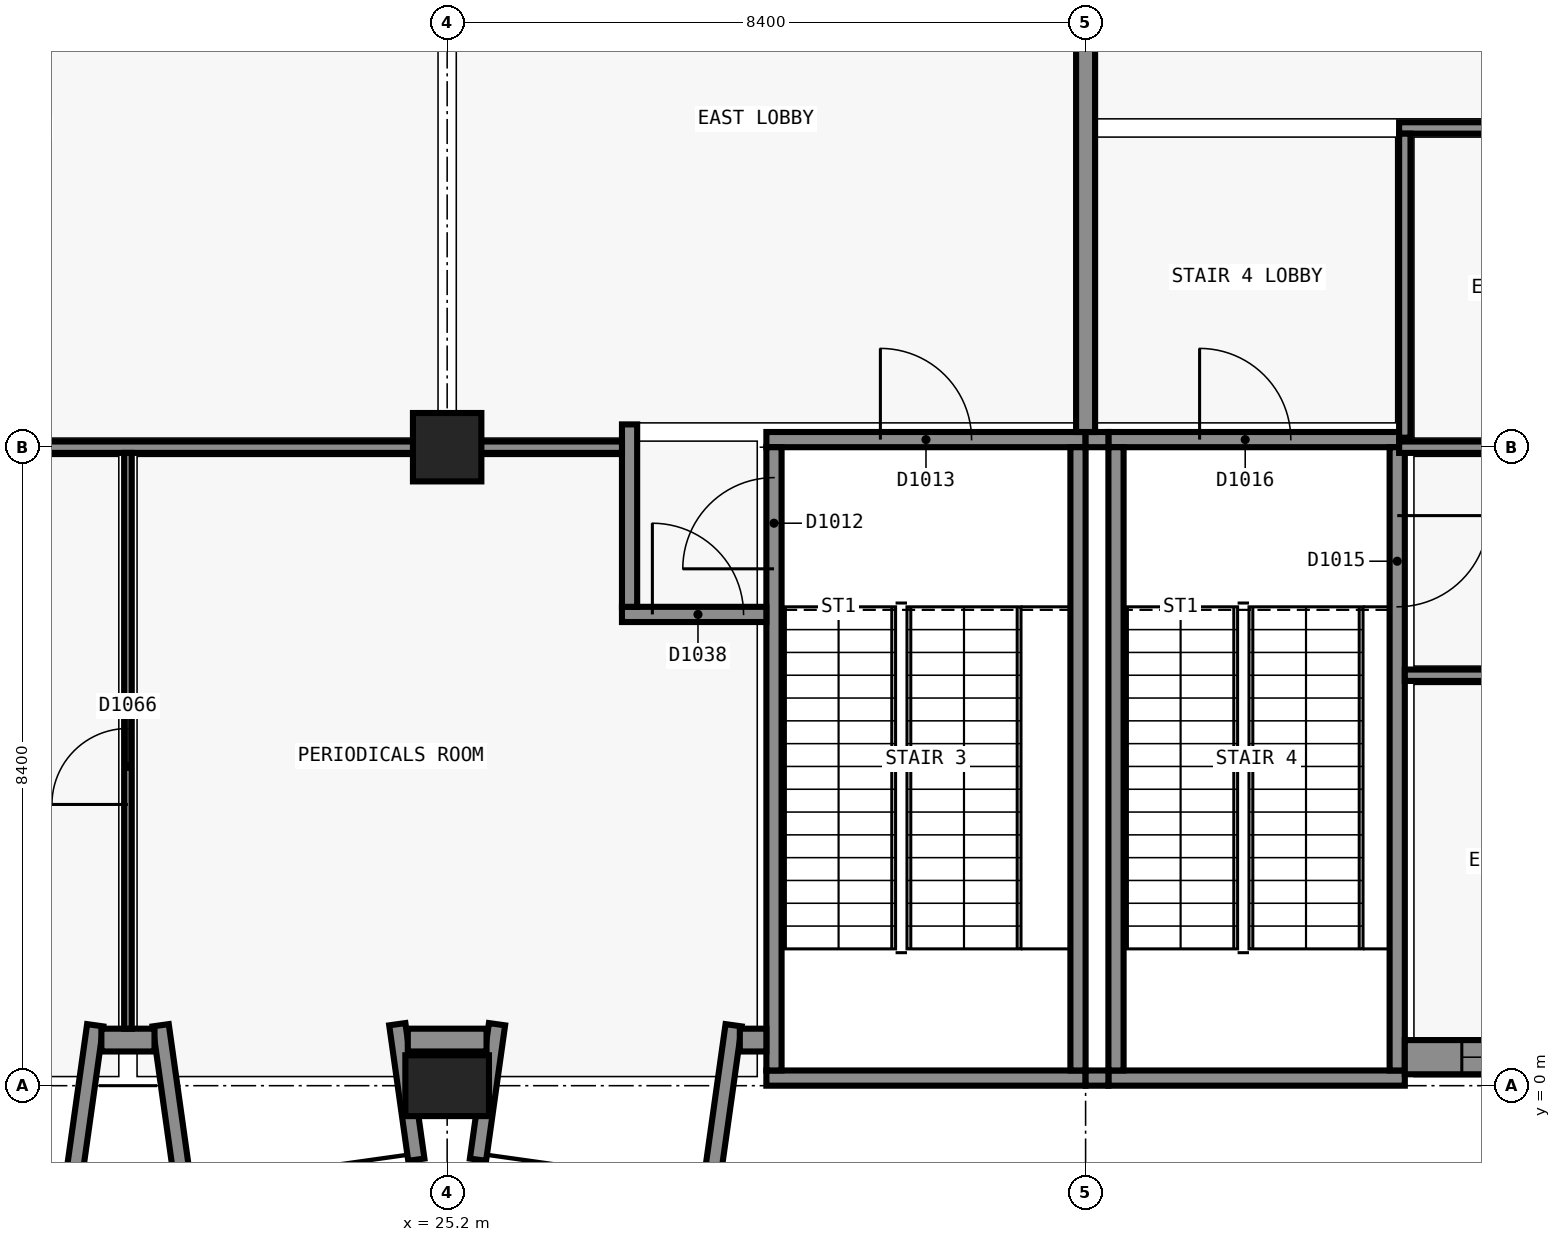
"""IFC4 building model, lengths in metres.
Left out: names, types, materials, properties, quantities, classifications, styles, units other than length and angle.
Written with IfcOpenShell. Run it as: python <this file> out.ifc"""

import sys

from ifc_helpers import new_model, si_unit, direction, frame, frame_2d, origin, origin_2d, place, context, subcontext, project, spatial, rectangle, extrude, element, fill, save


model = new_model("IFC4")
c1 = context("Model", 3, precision=1e-05, world=origin(), true_north=direction((0.0, 1.0)))
c2 = subcontext(c1, "Body", "Model", "MODEL_VIEW")
j1 = project(units=[si_unit("LENGTHUNIT", "METRE"), si_unit("PLANEANGLEUNIT", "RADIAN")], contexts=[c1])
p1 = place(None, origin())
s1 = spatial("IfcSite", under=j1, at=p1, CompositionType="ELEMENT")
p2 = place(p1, origin())
s2 = spatial("IfcBuilding", under=s1, at=p2, CompositionType="ELEMENT")
p3 = place(p2, frame((0.0, 0.0, 5.4)))
s3 = spatial("IfcBuildingStorey", under=s2, at=p3, CompositionType="ELEMENT", Elevation=5.4)
p4 = place(p3, frame((33.6, 0.1, 0.0), z_axis=(0.0, 0.0, 1.0), x_axis=(-1.0, 0.0, 0.0)))
e1 = element("IfcWall", 1, at=p4, inside=s3, PredefinedType="SHEAR", context=c2, shape_type="SweptSolid", body=[
    extrude(rectangle(XDim=4.2, YDim=0.2, at=frame_2d((2.1, 0.0))), origin(), (0.0, 0.0, 1.0), 4.8),
])
p5 = place(p3, frame((29.4, 8.5, 0.0), z_axis=(0.0, 0.0, 1.0), x_axis=(1.0, 0.0, 0.0)))
e2 = element("IfcWall", 2, at=p5, inside=s3, PredefinedType="SHEAR", context=c2, shape_type="SweptSolid", body=[
    extrude(rectangle(XDim=4.2, YDim=0.2, at=frame_2d((2.1, 0.0))), origin(), (0.0, 0.0, 1.0), 4.8),
])
p6 = place(p5, frame((1.5, 0.0, 0.0)))
e3 = element("IfcOpeningElement", 3, at=p6, cuts=e2, PredefinedType="OPENING", context=c2, shape_type="SweptSolid", body=[
    extrude(rectangle(XDim=1.2, YDim=2.1, at=frame_2d((0.6, 1.05))), frame((0.0, 0.11, 0.0), z_axis=(0.0, -1.0, 0.0), x_axis=(1.0, 0.0, 0.0)), (0.0, 0.0, 1.0), 0.22),
])
p7 = place(p3, frame((29.5, 0.2, 0.0), z_axis=(0.0, 0.0, 1.0), x_axis=(0.0, 1.0, 0.0)))
e4 = element("IfcWall", 4, at=p7, inside=s3, PredefinedType="SHEAR", context=c2, shape_type="SweptSolid", body=[
    extrude(rectangle(XDim=8.2, YDim=0.2, at=frame_2d((4.1, 0.0))), origin(), (0.0, 0.0, 1.0), 4.8),
])
p8 = place(p7, frame((6.6, 0.0, 0.0)))
e5 = element("IfcOpeningElement", 5, at=p8, cuts=e4, PredefinedType="OPENING", context=c2, shape_type="SweptSolid", body=[
    extrude(rectangle(XDim=1.2, YDim=2.1, at=frame_2d((0.6, 1.05))), frame((0.0, 0.11, 0.0), z_axis=(0.0, -1.0, 0.0), x_axis=(1.0, 0.0, 0.0)), (0.0, 0.0, 1.0), 0.22),
])
p9 = place(p3, frame((33.5, 8.4, 0.0), z_axis=(0.0, 0.0, 1.0), x_axis=(0.0, -1.0, 0.0)))
e6 = element("IfcWall", 6, at=p9, inside=s3, PredefinedType="SHEAR", context=c2, shape_type="SweptSolid", body=[
    extrude(rectangle(XDim=8.2, YDim=0.2, at=frame_2d((4.1, 0.0))), origin(), (0.0, 0.0, 1.0), 4.8),
])
p10 = place(p3, frame((37.8, 0.1, 0.0), z_axis=(0.0, 0.0, 1.0), x_axis=(-1.0, 0.0, 0.0)))
e7 = element("IfcWall", 7, at=p10, inside=s3, PredefinedType="SHEAR", context=c2, shape_type="SweptSolid", body=[
    extrude(rectangle(XDim=3.9, YDim=0.2, at=frame_2d((1.95, 0.0))), origin(), (0.0, 0.0, 1.0), 4.8),
])
p11 = place(p3, frame((33.9, 8.5, 0.0), z_axis=(0.0, 0.0, 1.0), x_axis=(1.0, 0.0, 0.0)))
e8 = element("IfcWall", 8, at=p11, inside=s3, PredefinedType="SHEAR", context=c2, shape_type="SweptSolid", body=[
    extrude(rectangle(XDim=3.9, YDim=0.2, at=frame_2d((1.95, 0.0))), origin(), (0.0, 0.0, 1.0), 4.8),
])
p12 = place(p11, frame((1.2, 0.0, 0.0)))
e9 = element("IfcOpeningElement", 9, at=p12, cuts=e8, PredefinedType="OPENING", context=c2, shape_type="SweptSolid", body=[
    extrude(rectangle(XDim=1.2, YDim=2.1, at=frame_2d((0.6, 1.05))), frame((0.0, 0.11, 0.0), z_axis=(0.0, -1.0, 0.0), x_axis=(1.0, 0.0, 0.0)), (0.0, 0.0, 1.0), 0.22),
])
p13 = place(p3, frame((34.0, 0.2, 0.0), z_axis=(0.0, 0.0, 1.0), x_axis=(0.0, 1.0, 0.0)))
e10 = element("IfcWall", 10, at=p13, inside=s3, PredefinedType="SHEAR", context=c2, shape_type="SweptSolid", body=[
    extrude(rectangle(XDim=8.2, YDim=0.2, at=frame_2d((4.1, 0.0))), origin(), (0.0, 0.0, 1.0), 4.8),
])
p14 = place(p3, frame((37.7, 8.4, 0.0), z_axis=(0.0, 0.0, 1.0), x_axis=(0.0, -1.0, 0.0)))
e11 = element("IfcWall", 11, at=p14, inside=s3, PredefinedType="SHEAR", context=c2, shape_type="SweptSolid", body=[
    extrude(rectangle(XDim=8.2, YDim=0.2, at=frame_2d((4.1, 0.0))), origin(), (0.0, 0.0, 1.0), 4.8),
])
p15 = place(p14, frame((0.9, 0.0, 0.0)))
e12 = element("IfcOpeningElement", 12, at=p15, cuts=e11, PredefinedType="OPENING", context=c2, shape_type="SweptSolid", body=[
    extrude(rectangle(XDim=1.2, YDim=2.1, at=frame_2d((0.6, 1.05))), frame((0.0, 0.11, 0.0), z_axis=(0.0, -1.0, 0.0), x_axis=(1.0, 0.0, 0.0)), (0.0, 0.0, 1.0), 0.22),
])
p16 = place(p3, frame((25.2, 0.0, 0.0), z_axis=(0.0, 0.0, 1.0), x_axis=(1.0, 0.0, 0.0)))
e13 = element("IfcColumn", 13, at=p16, inside=s3, PredefinedType="COLUMN", context=c2, shape_type="SweptSolid", body=[
    extrude(rectangle(XDim=1.1, YDim=0.8, at=origin_2d()), origin(), (0.0, 0.0, 1.0), 4.8),
])
p17 = place(p3, frame((25.2, 8.4, 0.0), z_axis=(0.0, 0.0, 1.0), x_axis=(1.0, 0.0, 0.0)))
e14 = element("IfcColumn", 14, at=p17, inside=s3, PredefinedType="COLUMN", context=c2, shape_type="SweptSolid", body=[
    extrude(rectangle(XDim=0.9, YDim=0.9, at=origin_2d()), origin(), (0.0, 0.0, 1.0), 4.8),
])
for number, where, z_axis, x_axis in (
    (15, (33.9, 0.1, 0.0), (0.0, 0.0, 1.0), (-1.0, 0.0, 0.0)),
    (16, (33.6, 8.5, 0.0), (0.0, 0.0, 1.0), (1.0, 0.0, 0.0)),
):
    element("IfcWall", number, at=place(p3, frame(where, z_axis=z_axis, x_axis=x_axis)), inside=s3, PredefinedType="SHEAR", context=c2, shape_type="SweptSolid", body=[
        extrude(rectangle(XDim=0.3, YDim=0.2, at=frame_2d((0.15, 0.0))), origin(), (0.0, 0.0, 1.0), 4.8),
    ])
for number, where, z_axis, x_axis in (
    (17, (20.569, 0.795, 0.0), (0.0, 0.0, 1.0), (-0.139, -0.99, 0.0)),
    (18, (21.431, 0.795, 0.0), (0.0, 0.0, 1.0), (0.139, -0.99, 0.0)),
):
    element("IfcWall", number, at=place(p3, frame(where, z_axis=z_axis, x_axis=x_axis)), inside=s3, PredefinedType="SOLIDWALL", context=c2, shape_type="SweptSolid", body=[
        extrude(rectangle(XDim=2.219, YDim=0.215, at=frame_2d((1.11, 0.0))), origin(), (0.0, 0.0, 1.0), 4.5),
    ])
for number, where, z_axis, x_axis in (
    (19, (24.544, 0.809, 0.0), (0.0, 0.0, 1.0), (0.139, -0.99, 0.0)),
    (20, (25.856, 0.809, 0.0), (0.0, 0.0, 1.0), (-0.139, -0.99, 0.0)),
):
    element("IfcWall", number, at=place(p3, frame(where, z_axis=z_axis, x_axis=x_axis)), inside=s3, PredefinedType="SOLIDWALL", context=c2, shape_type="SweptSolid", body=[
        extrude(rectangle(XDim=1.8, YDim=0.215, at=frame_2d((0.9, 0.0))), origin(), (0.0, 0.0, 1.0), 4.5),
    ])
p18 = place(p3, frame((28.969, 0.795, 0.0), z_axis=(0.0, 0.0, 1.0), x_axis=(-0.139249775508, -0.99025728981, 0.0)))
e21 = element("IfcWall", 21, at=p18, inside=s3, PredefinedType="SOLIDWALL", context=c2, shape_type="SweptSolid", body=[
    extrude(rectangle(XDim=2.22, YDim=0.215, at=frame_2d((1.11, 0.0))), origin(), (0.0, 0.0, 1.0), 4.5),
])
p19 = place(p3, frame((21.35, 0.6, 0.0), z_axis=(0.0, 0.0, 1.0), x_axis=(-1.0, 0.0, 0.0)))
e22 = element("IfcWall", 22, at=p19, inside=s3, PredefinedType="SOLIDWALL", context=c2, shape_type="SweptSolid", body=[
    extrude(rectangle(XDim=0.699, YDim=0.3, at=frame_2d((0.35, 0.0))), origin(), (0.0, 0.0, 1.0), 4.5),
])
p20 = place(p3, frame((25.718, 0.6, 0.0), z_axis=(0.0, 0.0, 1.0), x_axis=(-1.0, 0.0, 0.0)))
e23 = element("IfcWall", 23, at=p20, inside=s3, PredefinedType="SOLIDWALL", context=c2, shape_type="SweptSolid", body=[
    extrude(rectangle(XDim=1.036, YDim=0.3, at=frame_2d((0.518, 0.0))), origin(), (0.0, 0.0, 1.0), 4.5),
])
p21 = place(p3, frame((29.4, 0.6, 0.0), z_axis=(0.0, 0.0, 1.0), x_axis=(-1.0, 0.0, 0.0)))
e24 = element("IfcWall", 24, at=p21, inside=s3, PredefinedType="SOLIDWALL", context=c2, shape_type="SweptSolid", body=[
    extrude(rectangle(XDim=0.349, YDim=0.3, at=frame_2d((0.175, 0.0))), origin(), (0.0, 0.0, 1.0), 4.5),
])
p22 = place(p3, frame((44.481, 0.375, 0.0), z_axis=(0.0, 0.0, 1.0), x_axis=(-1.0, 0.0, 0.0)))
e25 = element("IfcWall", 25, at=p22, inside=s3, PredefinedType="SOLIDWALL", context=c2, shape_type="SweptSolid", body=[
    extrude(rectangle(XDim=6.681, YDim=0.45, at=frame_2d((3.341, 0.0))), origin(), (0.0, 0.0, 1.0), 4.5),
])
p23 = place(p22, frame((3.531, 0.0, 0.9)))
e26 = element("IfcOpeningElement", 26, at=p23, cuts=e25, PredefinedType="OPENING", context=c2, shape_type="SweptSolid", body=[
    extrude(rectangle(XDim=2.4, YDim=1.5, at=frame_2d((1.2, 0.75))), frame((0.0, 0.235, 0.0), z_axis=(0.0, -1.0, 0.0), x_axis=(1.0, 0.0, 0.0)), (0.0, 0.0, 1.0), 0.47),
])
p24 = place(p22, frame((0.341, 0.0, 0.9)))
e27 = element("IfcOpeningElement", 27, at=p24, cuts=e25, PredefinedType="OPENING", context=c2, shape_type="SweptSolid", body=[
    extrude(rectangle(XDim=1.2, YDim=1.5, at=frame_2d((0.6, 0.75))), frame((0.0, 0.235, 0.0), z_axis=(0.0, -1.0, 0.0), x_axis=(1.0, 0.0, 0.0)), (0.0, 0.0, 1.0), 0.47),
])
p25 = place(p3, frame((33.6, 8.6, 0.0), z_axis=(0.0, 0.0, 1.0), x_axis=(0.0, 1.0, 0.0)))
e28 = element("IfcWall", 28, at=p25, inside=s3, PredefinedType="SOLIDWALL", context=c2, shape_type="SweptSolid", body=[
    extrude(rectangle(XDim=15.85, YDim=0.25, at=frame_2d((7.925, 0.0))), origin(), (0.0, 0.0, 1.0), 3.8),
])
p26 = place(p3, frame((27.5, 6.2, 0.0), z_axis=(0.0, 0.0, 1.0), x_axis=(1.0, 0.0, 0.0)))
e29 = element("IfcWall", 29, at=p26, inside=s3, PredefinedType="SOLIDWALL", context=c2, shape_type="SweptSolid", body=[
    extrude(rectangle(XDim=1.9, YDim=0.2, at=frame_2d((0.95, 0.0))), origin(), (0.0, 0.0, 1.0), 4.5),
])
p27 = place(p26, frame((0.4, 0.0, 0.0)))
e30 = element("IfcOpeningElement", 30, at=p27, cuts=e29, PredefinedType="OPENING", context=c2, shape_type="SweptSolid", body=[
    extrude(rectangle(XDim=1.2, YDim=2.1, at=frame_2d((0.6, 1.05))), frame((0.0, 0.11, 0.0), z_axis=(0.0, -1.0, 0.0), x_axis=(1.0, 0.0, 0.0)), (0.0, 0.0, 1.0), 0.22),
])
p28 = place(p3, frame((27.6, 6.3, 0.0), z_axis=(0.0, 0.0, 1.0), x_axis=(0.0, 1.0, 0.0)))
e31 = element("IfcWall", 31, at=p28, inside=s3, PredefinedType="SOLIDWALL", context=c2, shape_type="SweptSolid", body=[
    extrude(rectangle(XDim=2.4, YDim=0.2, at=frame_2d((1.2, 0.0))), origin(), (0.0, 0.0, 1.0), 4.0),
])
p29 = place(p3, frame((37.8, 5.4, 0.0), z_axis=(0.0, 0.0, 1.0), x_axis=(1.0, 0.0, 0.0)))
e32 = element("IfcWall", 32, at=p29, inside=s3, PredefinedType="PARTITIONING", context=c2, shape_type="SweptSolid", body=[
    extrude(rectangle(XDim=20.3, YDim=0.15, at=frame_2d((10.15, 0.0))), origin(), (0.0, 0.0, 1.0), 3.8),
])
p30 = place(p29, frame((1.6, 0.0, 0.0)))
e33 = element("IfcOpeningElement", 33, at=p30, cuts=e32, PredefinedType="OPENING", context=c2, shape_type="SweptSolid", body=[
    extrude(rectangle(XDim=1.0, YDim=2.1, at=frame_2d((0.5, 1.05))), frame((0.0, 0.085, 0.0), z_axis=(0.0, -1.0, 0.0), x_axis=(1.0, 0.0, 0.0)), (0.0, 0.0, 1.0), 0.17),
])
p31 = place(p29, frame((5.8, 0.0, 0.0)))
e34 = element("IfcOpeningElement", 34, at=p31, cuts=e32, PredefinedType="OPENING", context=c2, shape_type="SweptSolid", body=[
    extrude(rectangle(XDim=1.0, YDim=2.1, at=frame_2d((0.5, 1.05))), frame((0.0, 0.085, 0.0), z_axis=(0.0, -1.0, 0.0), x_axis=(1.0, 0.0, 0.0)), (0.0, 0.0, 1.0), 0.17),
])
p32 = place(p29, frame((10.0, 0.0, 0.0)))
e35 = element("IfcOpeningElement", 35, at=p32, cuts=e32, PredefinedType="OPENING", context=c2, shape_type="SweptSolid", body=[
    extrude(rectangle(XDim=1.0, YDim=2.1, at=frame_2d((0.5, 1.05))), frame((0.0, 0.085, 0.0), z_axis=(0.0, -1.0, 0.0), x_axis=(1.0, 0.0, 0.0)), (0.0, 0.0, 1.0), 0.17),
])
p33 = place(p29, frame((14.2, 0.0, 0.0)))
e36 = element("IfcOpeningElement", 36, at=p33, cuts=e32, PredefinedType="OPENING", context=c2, shape_type="SweptSolid", body=[
    extrude(rectangle(XDim=1.0, YDim=2.1, at=frame_2d((0.5, 1.05))), frame((0.0, 0.085, 0.0), z_axis=(0.0, -1.0, 0.0), x_axis=(1.0, 0.0, 0.0)), (0.0, 0.0, 1.0), 0.17),
])
p34 = place(p29, frame((18.4, 0.0, 0.0)))
e37 = element("IfcOpeningElement", 37, at=p34, cuts=e32, PredefinedType="OPENING", context=c2, shape_type="SweptSolid", body=[
    extrude(rectangle(XDim=1.0, YDim=2.1, at=frame_2d((0.5, 1.05))), frame((0.0, 0.085, 0.0), z_axis=(0.0, -1.0, 0.0), x_axis=(1.0, 0.0, 0.0)), (0.0, 0.0, 1.0), 0.17),
])
p35 = place(p3, frame((8.325, 8.4, 0.0), z_axis=(0.0, 0.0, 1.0), x_axis=(1.0, 0.0, 0.0)))
e38 = element("IfcWall", 38, at=p35, inside=s3, PredefinedType="PARTITIONING", context=c2, shape_type="SweptSolid", body=[
    extrude(rectangle(XDim=19.175, YDim=0.15, at=frame_2d((9.587, 0.0))), origin(), (0.0, 0.0, 1.0), 3.8),
])
p36 = place(p3, frame((37.725, 8.4, 0.0), z_axis=(0.0, 0.0, 1.0), x_axis=(1.0, 0.0, 0.0)))
e39 = element("IfcWall", 39, at=p36, inside=s3, PredefinedType="PARTITIONING", context=c2, shape_type="SweptSolid", body=[
    extrude(rectangle(XDim=20.375, YDim=0.15, at=frame_2d((10.188, 0.0))), origin(), (0.0, 0.0, 1.0), 3.8),
])
p37 = place(p36, frame((1.675, 0.0, 0.0)))
e40 = element("IfcOpeningElement", 40, at=p37, cuts=e39, PredefinedType="OPENING", context=c2, shape_type="SweptSolid", body=[
    extrude(rectangle(XDim=1.0, YDim=2.1, at=frame_2d((0.5, 1.05))), frame((0.0, 0.085, 0.0), z_axis=(0.0, -1.0, 0.0), x_axis=(1.0, 0.0, 0.0)), (0.0, 0.0, 1.0), 0.17),
])
p38 = place(p36, frame((5.875, 0.0, 0.0)))
e41 = element("IfcOpeningElement", 41, at=p38, cuts=e39, PredefinedType="OPENING", context=c2, shape_type="SweptSolid", body=[
    extrude(rectangle(XDim=1.0, YDim=2.1, at=frame_2d((0.5, 1.05))), frame((0.0, 0.085, 0.0), z_axis=(0.0, -1.0, 0.0), x_axis=(1.0, 0.0, 0.0)), (0.0, 0.0, 1.0), 0.17),
])
p39 = place(p36, frame((10.075, 0.0, 0.0)))
e42 = element("IfcOpeningElement", 42, at=p39, cuts=e39, PredefinedType="OPENING", context=c2, shape_type="SweptSolid", body=[
    extrude(rectangle(XDim=1.0, YDim=2.1, at=frame_2d((0.5, 1.05))), frame((0.0, 0.085, 0.0), z_axis=(0.0, -1.0, 0.0), x_axis=(1.0, 0.0, 0.0)), (0.0, 0.0, 1.0), 0.17),
])
p40 = place(p36, frame((14.275, 0.0, 0.0)))
e43 = element("IfcOpeningElement", 43, at=p40, cuts=e39, PredefinedType="OPENING", context=c2, shape_type="SweptSolid", body=[
    extrude(rectangle(XDim=1.0, YDim=2.1, at=frame_2d((0.5, 1.05))), frame((0.0, 0.085, 0.0), z_axis=(0.0, -1.0, 0.0), x_axis=(1.0, 0.0, 0.0)), (0.0, 0.0, 1.0), 0.17),
])
p41 = place(p36, frame((18.475, 0.0, 0.0)))
e44 = element("IfcOpeningElement", 44, at=p41, cuts=e39, PredefinedType="OPENING", context=c2, shape_type="SweptSolid", body=[
    extrude(rectangle(XDim=1.0, YDim=2.1, at=frame_2d((0.5, 1.05))), frame((0.0, 0.085, 0.0), z_axis=(0.0, -1.0, 0.0), x_axis=(1.0, 0.0, 0.0)), (0.0, 0.0, 1.0), 0.17),
])
p42 = place(p3, frame((37.725, 12.6, 0.0), z_axis=(0.0, 0.0, 1.0), x_axis=(1.0, 0.0, 0.0)))
e45 = element("IfcWall", 45, at=p42, inside=s3, PredefinedType="PARTITIONING", context=c2, shape_type="SweptSolid", body=[
    extrude(rectangle(XDim=20.375, YDim=0.15, at=frame_2d((10.188, 0.0))), origin(), (0.0, 0.0, 1.0), 3.8),
])
p43 = place(p3, frame((37.8, 8.525, 0.0), z_axis=(0.0, 0.0, 1.0), x_axis=(0.0, 1.0, 0.0)))
e46 = element("IfcWall", 46, at=p43, inside=s3, PredefinedType="PARTITIONING", context=c2, shape_type="SweptSolid", body=[
    extrude(rectangle(XDim=4.0, YDim=0.15, at=frame_2d((2.0, 0.0))), origin(), (0.0, 0.0, 1.0), 4.0),
])
p44 = place(p3, frame((21.0, 0.75, 0.0), z_axis=(0.0, 0.0, 1.0), x_axis=(0.0, 1.0, 0.0)))
e47 = element("IfcWall", 47, at=p44, inside=s3, PredefinedType="PARTITIONING", context=c2, shape_type="SweptSolid", body=[
    extrude(rectangle(XDim=7.575, YDim=0.1, at=frame_2d((3.788, 0.0))), origin(), (0.0, 0.0, 1.0), 3.8),
])
p45 = place(p44, frame((2.95, 0.0, 0.0)))
e48 = element("IfcOpeningElement", 48, at=p45, cuts=e47, PredefinedType="OPENING", context=c2, shape_type="SweptSolid", body=[
    extrude(rectangle(XDim=1.0, YDim=2.1, at=frame_2d((0.5, 1.05))), frame((0.0, 0.06, 0.0), z_axis=(0.0, -1.0, 0.0), x_axis=(1.0, 0.0, 0.0)), (0.0, 0.0, 1.0), 0.12),
])
p46 = place(p23, origin())
e49 = element("IfcWindow", 49, at=p46, inside=s3, PartitioningType="SINGLE_PANEL", PredefinedType="WINDOW", context=c2, shape_type="SweptSolid", body=[
    extrude(rectangle(XDim=2.4, YDim=1.5, at=frame_2d((1.2, 0.75))), frame((0.0, 0.03, 0.0), z_axis=(0.0, -1.0, 0.0), x_axis=(1.0, 0.0, 0.0)), (0.0, 0.0, 1.0), 0.06),
])
fill(e26, e49)
p47 = place(p8, origin())
e50 = element("IfcDoor", 50, at=p47, inside=s3, OperationType="SINGLE_SWING_RIGHT", PredefinedType="DOOR", context=c2, shape_type="SweptSolid", body=[
    extrude(rectangle(XDim=1.2, YDim=2.1, at=frame_2d((0.6, 1.05))), frame((0.0, 0.025, 0.0), z_axis=(0.0, -1.0, 0.0), x_axis=(1.0, 0.0, 0.0)), (0.0, 0.0, 1.0), 0.05),
])
fill(e5, e50)
p48 = place(p6, origin())
e51 = element("IfcDoor", 51, at=p48, inside=s3, OperationType="SINGLE_SWING_RIGHT", PredefinedType="DOOR", context=c2, shape_type="SweptSolid", body=[
    extrude(rectangle(XDim=1.2, YDim=2.1, at=frame_2d((0.6, 1.05))), frame((0.0, 0.025, 0.0), z_axis=(0.0, -1.0, 0.0), x_axis=(1.0, 0.0, 0.0)), (0.0, 0.0, 1.0), 0.05),
])
fill(e3, e51)
p49 = place(p15, origin())
e52 = element("IfcDoor", 52, at=p49, inside=s3, OperationType="SINGLE_SWING_RIGHT", PredefinedType="DOOR", context=c2, shape_type="SweptSolid", body=[
    extrude(rectangle(XDim=1.2, YDim=2.1, at=frame_2d((0.6, 1.05))), frame((0.0, 0.025, 0.0), z_axis=(0.0, -1.0, 0.0), x_axis=(1.0, 0.0, 0.0)), (0.0, 0.0, 1.0), 0.05),
])
fill(e12, e52)
p50 = place(p12, origin())
e53 = element("IfcDoor", 53, at=p50, inside=s3, OperationType="SINGLE_SWING_RIGHT", PredefinedType="DOOR", context=c2, shape_type="SweptSolid", body=[
    extrude(rectangle(XDim=1.2, YDim=2.1, at=frame_2d((0.6, 1.05))), frame((0.0, 0.025, 0.0), z_axis=(0.0, -1.0, 0.0), x_axis=(1.0, 0.0, 0.0)), (0.0, 0.0, 1.0), 0.05),
])
fill(e9, e53)
p51 = place(p27, origin())
e54 = element("IfcDoor", 54, at=p51, inside=s3, OperationType="SINGLE_SWING_RIGHT", PredefinedType="DOOR", context=c2, shape_type="SweptSolid", body=[
    extrude(rectangle(XDim=1.2, YDim=2.1, at=frame_2d((0.6, 1.05))), frame((0.0, 0.025, 0.0), z_axis=(0.0, -1.0, 0.0), x_axis=(1.0, 0.0, 0.0)), (0.0, 0.0, 1.0), 0.05),
])
fill(e30, e54)
p52 = place(p45, origin())
e55 = element("IfcDoor", 55, at=p52, inside=s3, OperationType="SINGLE_SWING_RIGHT", PredefinedType="DOOR", context=c2, shape_type="SweptSolid", body=[
    extrude(rectangle(XDim=1.0, YDim=2.1, at=frame_2d((0.5, 1.05))), frame((0.0, 0.025, 0.0), z_axis=(0.0, -1.0, 0.0), x_axis=(1.0, 0.0, 0.0)), (0.0, 0.0, 1.0), 0.05),
])
fill(e48, e55)
save(model, sys.argv[1])
